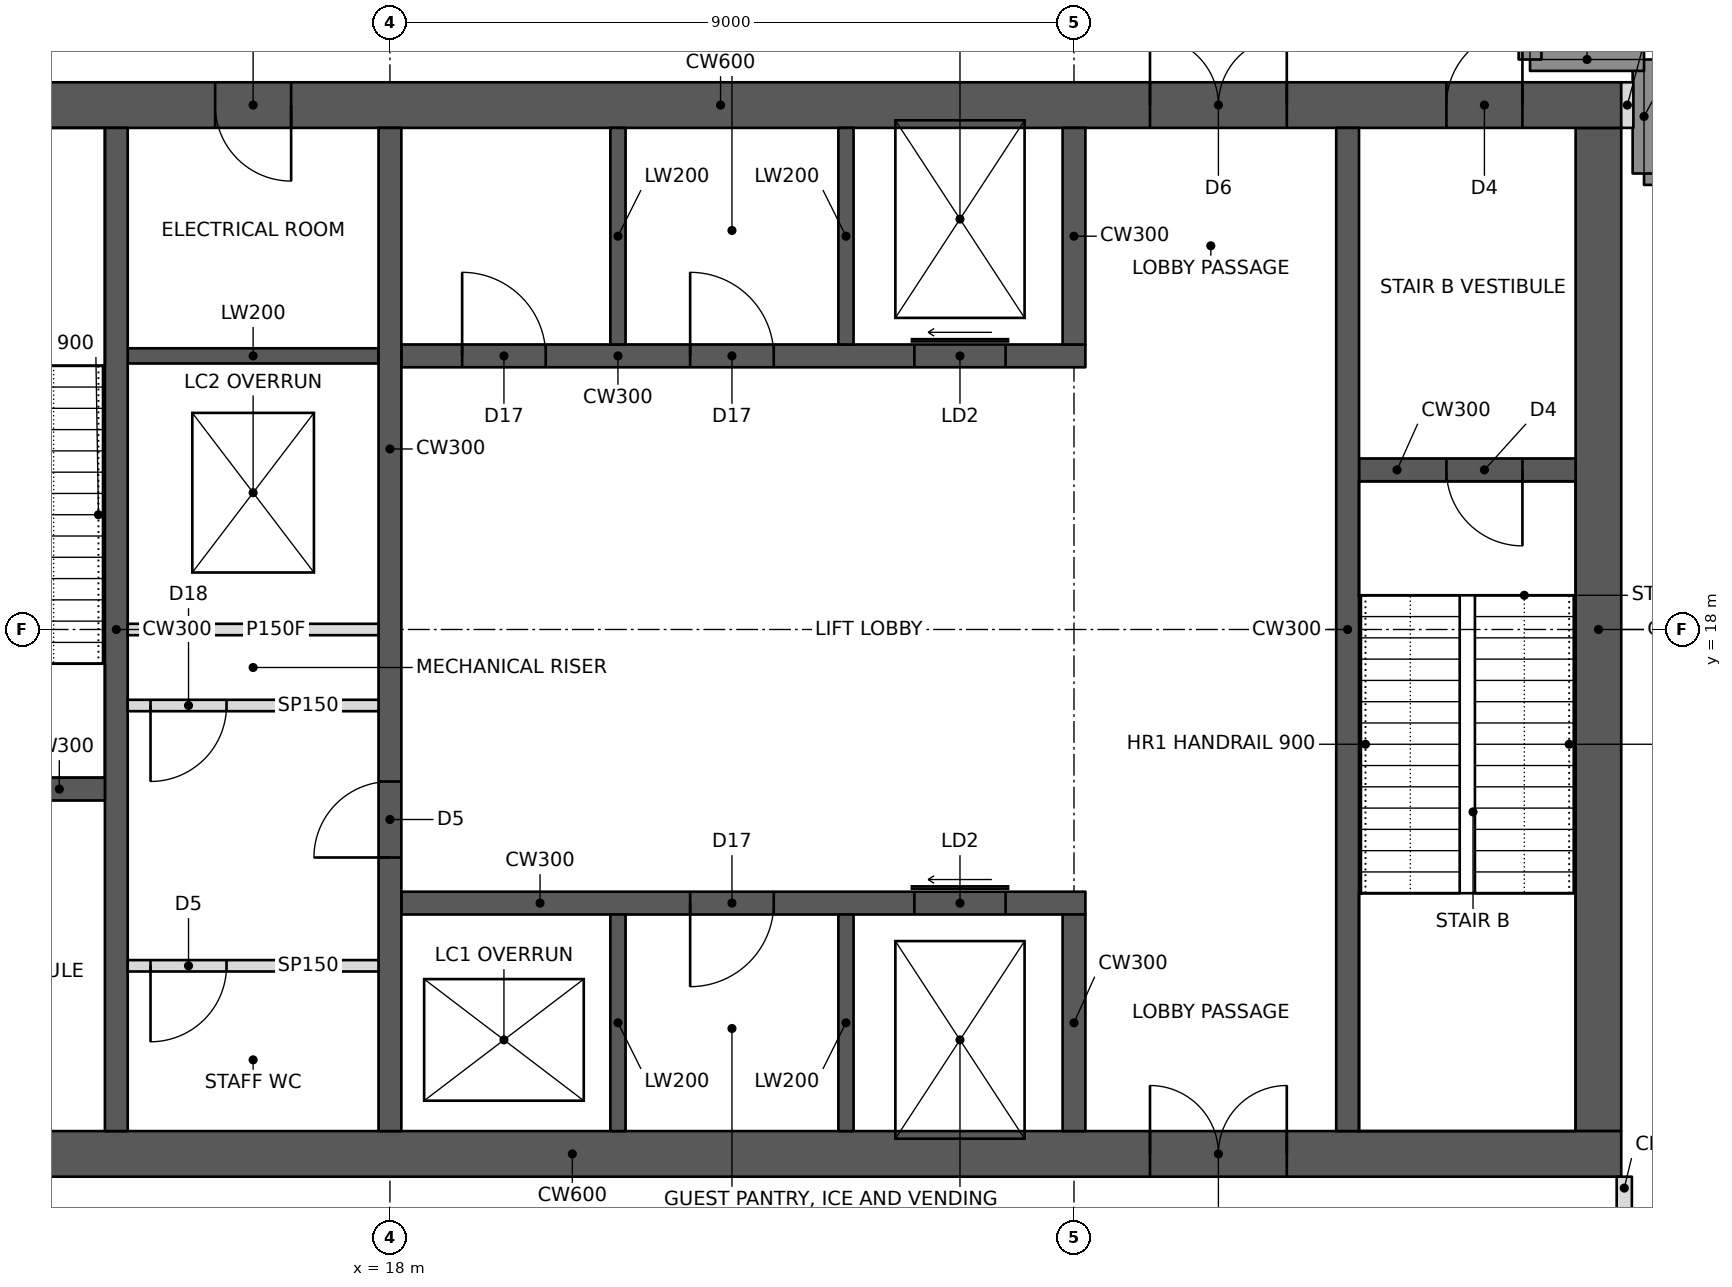
"""IFC4 building model, lengths in metres.
Left out: names, types, materials, properties, quantities, classifications, styles, units other than length and angle.
Written with IfcOpenShell. Run it as: python <this file> out.ifc"""

import sys

from ifc_helpers import new_model, si_unit, direction, frame, frame_2d, origin, place, context, subcontext, project, spatial, rectangle, extrude, element, fill, save


model = new_model("IFC4")
c1 = context("Model", 3, precision=1e-05, world=origin(), true_north=direction((0.0, 1.0)))
c2 = subcontext(c1, "Body", "Model", "MODEL_VIEW")
j1 = project(units=[si_unit("LENGTHUNIT", "METRE"), si_unit("PLANEANGLEUNIT", "RADIAN")], contexts=[c1])
p1 = place(None, origin())
s1 = spatial("IfcSite", under=j1, at=p1, CompositionType="ELEMENT")
p2 = place(p1, origin())
s2 = spatial("IfcBuilding", under=s1, at=p2, CompositionType="ELEMENT")
p3 = place(p2, frame((0.0, 0.0, 274.8)))
s3 = spatial("IfcBuildingStorey", under=s2, at=p3, CompositionType="ELEMENT", Elevation=274.8)
p4 = place(p3, frame((10.8, 11.1, 0.0), z_axis=(0.0, 0.0, 1.0), x_axis=(1.0, 0.0, 0.0)))
e1 = element("IfcWall", 1, at=p4, inside=s3, PredefinedType="SHEAR", context=c2, shape_type="SweptSolid", body=[
    extrude(rectangle(XDim=23.4, YDim=0.6, at=frame_2d((11.7, 0.0))), origin(), (0.0, 0.0, 1.0), 4.7),
])
p5 = place(p4, frame((1.0, 0.0, 0.0)))
e2 = element("IfcOpeningElement", 2, at=p5, cuts=e1, PredefinedType="OPENING", context=c2, shape_type="SweptSolid", body=[
    extrude(rectangle(XDim=1.0, YDim=2.1, at=frame_2d((0.5, 1.05))), frame((0.0, 0.31, 0.0), z_axis=(0.0, -1.0, 0.0), x_axis=(1.0, 0.0, 0.0)), (0.0, 0.0, 1.0), 0.62),
])
p6 = place(p4, frame((17.2, 0.0, 0.0)))
e3 = element("IfcOpeningElement", 3, at=p6, cuts=e1, PredefinedType="OPENING", context=c2, shape_type="SweptSolid", body=[
    extrude(rectangle(XDim=1.8, YDim=2.1, at=frame_2d((0.9, 1.05))), frame((0.0, 0.31, 0.0), z_axis=(0.0, -1.0, 0.0), x_axis=(1.0, 0.0, 0.0)), (0.0, 0.0, 1.0), 0.62),
])
p7 = place(p3, frame((10.8, 24.9, 0.0), z_axis=(0.0, 0.0, 1.0), x_axis=(1.0, 0.0, 0.0)))
e4 = element("IfcWall", 4, at=p7, inside=s3, PredefinedType="SHEAR", context=c2, shape_type="SweptSolid", body=[
    extrude(rectangle(XDim=23.4, YDim=0.6, at=frame_2d((11.7, 0.0))), origin(), (0.0, 0.0, 1.0), 4.7),
])
p8 = place(p7, frame((17.2, 0.0, 0.0)))
e5 = element("IfcOpeningElement", 5, at=p8, cuts=e4, PredefinedType="OPENING", context=c2, shape_type="SweptSolid", body=[
    extrude(rectangle(XDim=1.8, YDim=2.1, at=frame_2d((0.9, 1.05))), frame((0.0, 0.31, 0.0), z_axis=(0.0, -1.0, 0.0), x_axis=(1.0, 0.0, 0.0)), (0.0, 0.0, 1.0), 0.62),
])
p9 = place(p7, frame((21.1, 0.0, 0.0)))
e6 = element("IfcOpeningElement", 6, at=p9, cuts=e4, PredefinedType="OPENING", context=c2, shape_type="SweptSolid", body=[
    extrude(rectangle(XDim=1.0, YDim=2.1, at=frame_2d((0.5, 1.05))), frame((0.0, 0.31, 0.0), z_axis=(0.0, -1.0, 0.0), x_axis=(1.0, 0.0, 0.0)), (0.0, 0.0, 1.0), 0.62),
])
p10 = place(p7, frame((4.9, 0.0, 0.0)))
e7 = element("IfcOpeningElement", 7, at=p10, cuts=e4, PredefinedType="OPENING", context=c2, shape_type="SweptSolid", body=[
    extrude(rectangle(XDim=1.0, YDim=2.1, at=frame_2d((0.5, 1.05))), frame((0.0, 0.31, 0.0), z_axis=(0.0, -1.0, 0.0), x_axis=(1.0, 0.0, 0.0)), (0.0, 0.0, 1.0), 0.62),
])
p11 = place(p3, frame((33.9, 11.4, 0.0), z_axis=(0.0, 0.0, 1.0), x_axis=(0.0, 1.0, 0.0)))
e8 = element("IfcWall", 8, at=p11, inside=s3, PredefinedType="SHEAR", context=c2, shape_type="SweptSolid", body=[
    extrude(rectangle(XDim=13.2, YDim=0.6, at=frame_2d((6.6, 0.0))), origin(), (0.0, 0.0, 1.0), 4.7),
])
p12 = place(p3, frame((14.4, 11.4, 0.0), z_axis=(0.0, 0.0, 1.0), x_axis=(0.0, 1.0, 0.0)))
e9 = element("IfcWall", 9, at=p12, inside=s3, PredefinedType="SHEAR", context=c2, shape_type="SweptSolid", body=[
    extrude(rectangle(XDim=13.2, YDim=0.3, at=frame_2d((6.6, 0.0))), origin(), (0.0, 0.0, 1.0), 4.7),
])
p13 = place(p3, frame((11.4, 15.9, 0.0), z_axis=(0.0, 0.0, 1.0), x_axis=(1.0, 0.0, 0.0)))
e10 = element("IfcWall", 10, at=p13, inside=s3, PredefinedType="SHEAR", context=c2, shape_type="SweptSolid", body=[
    extrude(rectangle(XDim=2.85, YDim=0.3, at=frame_2d((1.425, 0.0))), origin(), (0.0, 0.0, 1.0), 4.7),
])
p14 = place(p13, frame((0.5, 0.0, 0.0)))
e11 = element("IfcOpeningElement", 11, at=p14, cuts=e10, PredefinedType="OPENING", context=c2, shape_type="SweptSolid", body=[
    extrude(rectangle(XDim=1.0, YDim=2.1, at=frame_2d((0.5, 1.05))), frame((0.0, 0.16, 0.0), z_axis=(0.0, -1.0, 0.0), x_axis=(1.0, 0.0, 0.0)), (0.0, 0.0, 1.0), 0.32),
])
p15 = place(p3, frame((18.0, 11.4, 0.0), z_axis=(0.0, 0.0, 1.0), x_axis=(0.0, 1.0, 0.0)))
e12 = element("IfcWall", 12, at=p15, inside=s3, PredefinedType="SHEAR", context=c2, shape_type="SweptSolid", body=[
    extrude(rectangle(XDim=13.2, YDim=0.3, at=frame_2d((6.6, 0.0))), origin(), (0.0, 0.0, 1.0), 4.7),
])
p16 = place(p15, frame((3.6, 0.0, 0.0)))
e13 = element("IfcOpeningElement", 13, at=p16, cuts=e12, PredefinedType="OPENING", context=c2, shape_type="SweptSolid", body=[
    extrude(rectangle(XDim=1.0, YDim=2.1, at=frame_2d((0.5, 1.05))), frame((0.0, 0.16, 0.0), z_axis=(0.0, -1.0, 0.0), x_axis=(1.0, 0.0, 0.0)), (0.0, 0.0, 1.0), 0.32),
])
p17 = place(p3, frame((14.55, 18.0, 0.0), z_axis=(0.0, 0.0, 1.0), x_axis=(1.0, 0.0, 0.0)))
e14 = element("IfcWall", 14, at=p17, inside=s3, PredefinedType="PARTITIONING", context=c2, shape_type="SweptSolid", body=[
    extrude(rectangle(XDim=3.3, YDim=0.15, at=frame_2d((1.65, 0.0))), origin(), (0.0, 0.0, 1.0), 4.7),
])
p18 = place(p3, frame((18.15, 14.4, 0.0), z_axis=(0.0, 0.0, 1.0), x_axis=(1.0, 0.0, 0.0)))
e15 = element("IfcWall", 15, at=p18, inside=s3, PredefinedType="SHEAR", context=c2, shape_type="SweptSolid", body=[
    extrude(rectangle(XDim=9.0, YDim=0.3, at=frame_2d((4.5, 0.0))), origin(), (0.0, 0.0, 1.0), 4.7),
])
p19 = place(p18, frame((6.75, 0.0, 0.0)))
e16 = element("IfcOpeningElement", 16, at=p19, cuts=e15, PredefinedType="OPENING", context=c2, shape_type="SweptSolid", body=[
    extrude(rectangle(XDim=1.2, YDim=2.1, at=frame_2d((0.6, 1.05))), frame((0.0, 0.16, 0.0), z_axis=(0.0, -1.0, 0.0), x_axis=(1.0, 0.0, 0.0)), (0.0, 0.0, 1.0), 0.32),
])
p20 = place(p18, frame((3.8, 0.0, 0.0)))
e17 = element("IfcOpeningElement", 17, at=p20, cuts=e15, PredefinedType="OPENING", context=c2, shape_type="SweptSolid", body=[
    extrude(rectangle(XDim=1.1, YDim=2.1, at=frame_2d((0.55, 1.05))), frame((0.0, 0.16, 0.0), z_axis=(0.0, -1.0, 0.0), x_axis=(1.0, 0.0, 0.0)), (0.0, 0.0, 1.0), 0.32),
])
p21 = place(p3, frame((27.0, 11.4, 0.0), z_axis=(0.0, 0.0, 1.0), x_axis=(0.0, 1.0, 0.0)))
e18 = element("IfcWall", 18, at=p21, inside=s3, PredefinedType="SHEAR", context=c2, shape_type="SweptSolid", body=[
    extrude(rectangle(XDim=2.85, YDim=0.3, at=frame_2d((1.425, 0.0))), origin(), (0.0, 0.0, 1.0), 4.7),
])
for number, where, z_axis, x_axis in (
    (19, (21.0, 11.4, 0.0), (0.0, 0.0, 1.0), (0.0, 1.0, 0.0)),
    (20, (24.0, 11.4, 0.0), (0.0, 0.0, 1.0), (0.0, 1.0, 0.0)),
):
    element("IfcWall", number, at=place(p3, frame(where, z_axis=z_axis, x_axis=x_axis)), inside=s3, PredefinedType="SHEAR", context=c2, shape_type="SweptSolid", body=[
        extrude(rectangle(XDim=2.85, YDim=0.2, at=frame_2d((1.425, 0.0))), origin(), (0.0, 0.0, 1.0), 4.7),
    ])
p22 = place(p3, frame((18.15, 21.6, 0.0), z_axis=(0.0, 0.0, 1.0), x_axis=(1.0, 0.0, 0.0)))
e21 = element("IfcWall", 21, at=p22, inside=s3, PredefinedType="SHEAR", context=c2, shape_type="SweptSolid", body=[
    extrude(rectangle(XDim=9.0, YDim=0.3, at=frame_2d((4.5, 0.0))), origin(), (0.0, 0.0, 1.0), 4.7),
])
p23 = place(p22, frame((6.75, 0.0, 0.0)))
e22 = element("IfcOpeningElement", 22, at=p23, cuts=e21, PredefinedType="OPENING", context=c2, shape_type="SweptSolid", body=[
    extrude(rectangle(XDim=1.2, YDim=2.1, at=frame_2d((0.6, 1.05))), frame((0.0, 0.16, 0.0), z_axis=(0.0, -1.0, 0.0), x_axis=(1.0, 0.0, 0.0)), (0.0, 0.0, 1.0), 0.32),
])
p24 = place(p22, frame((0.8, 0.0, 0.0)))
e23 = element("IfcOpeningElement", 23, at=p24, cuts=e21, PredefinedType="OPENING", context=c2, shape_type="SweptSolid", body=[
    extrude(rectangle(XDim=1.1, YDim=2.1, at=frame_2d((0.55, 1.05))), frame((0.0, 0.16, 0.0), z_axis=(0.0, -1.0, 0.0), x_axis=(1.0, 0.0, 0.0)), (0.0, 0.0, 1.0), 0.32),
])
p25 = place(p22, frame((3.8, 0.0, 0.0)))
e24 = element("IfcOpeningElement", 24, at=p25, cuts=e21, PredefinedType="OPENING", context=c2, shape_type="SweptSolid", body=[
    extrude(rectangle(XDim=1.1, YDim=2.1, at=frame_2d((0.55, 1.05))), frame((0.0, 0.16, 0.0), z_axis=(0.0, -1.0, 0.0), x_axis=(1.0, 0.0, 0.0)), (0.0, 0.0, 1.0), 0.32),
])
p26 = place(p3, frame((27.0, 21.75, 0.0), z_axis=(0.0, 0.0, 1.0), x_axis=(0.0, 1.0, 0.0)))
e25 = element("IfcWall", 25, at=p26, inside=s3, PredefinedType="SHEAR", context=c2, shape_type="SweptSolid", body=[
    extrude(rectangle(XDim=2.85, YDim=0.3, at=frame_2d((1.425, 0.0))), origin(), (0.0, 0.0, 1.0), 4.7),
])
for number, where, z_axis, x_axis in (
    (26, (21.0, 21.75, 0.0), (0.0, 0.0, 1.0), (0.0, 1.0, 0.0)),
    (27, (24.0, 21.75, 0.0), (0.0, 0.0, 1.0), (0.0, 1.0, 0.0)),
):
    element("IfcWall", number, at=place(p3, frame(where, z_axis=z_axis, x_axis=x_axis)), inside=s3, PredefinedType="SHEAR", context=c2, shape_type="SweptSolid", body=[
        extrude(rectangle(XDim=2.85, YDim=0.2, at=frame_2d((1.425, 0.0))), origin(), (0.0, 0.0, 1.0), 4.7),
    ])
p27 = place(p3, frame((30.6, 11.4, 0.0), z_axis=(0.0, 0.0, 1.0), x_axis=(0.0, 1.0, 0.0)))
e28 = element("IfcWall", 28, at=p27, inside=s3, PredefinedType="SHEAR", context=c2, shape_type="SweptSolid", body=[
    extrude(rectangle(XDim=13.2, YDim=0.3, at=frame_2d((6.6, 0.0))), origin(), (0.0, 0.0, 1.0), 4.7),
])
p28 = place(p3, frame((30.75, 20.1, 0.0), z_axis=(0.0, 0.0, 1.0), x_axis=(1.0, 0.0, 0.0)))
e29 = element("IfcWall", 29, at=p28, inside=s3, PredefinedType="SHEAR", context=c2, shape_type="SweptSolid", body=[
    extrude(rectangle(XDim=2.85, YDim=0.3, at=frame_2d((1.425, 0.0))), origin(), (0.0, 0.0, 1.0), 4.7),
])
p29 = place(p28, frame((1.15, 0.0, 0.0)))
e30 = element("IfcOpeningElement", 30, at=p29, cuts=e29, PredefinedType="OPENING", context=c2, shape_type="SweptSolid", body=[
    extrude(rectangle(XDim=1.0, YDim=2.1, at=frame_2d((0.5, 1.05))), frame((0.0, 0.16, 0.0), z_axis=(0.0, -1.0, 0.0), x_axis=(1.0, 0.0, 0.0)), (0.0, 0.0, 1.0), 0.32),
])
p30 = place(p3, frame((14.55, 21.6, 0.0), z_axis=(0.0, 0.0, 1.0), x_axis=(1.0, 0.0, 0.0)))
e31 = element("IfcWall", 31, at=p30, inside=s3, PredefinedType="SHEAR", context=c2, shape_type="SweptSolid", body=[
    extrude(rectangle(XDim=3.3, YDim=0.2, at=frame_2d((1.65, 0.0))), origin(), (0.0, 0.0, 1.0), 4.7),
])
p31 = place(p3, frame((36.0, 24.0, 0.0), z_axis=(0.0, 0.0, 1.0), x_axis=(-1.0, 0.0, 0.0)))
e32 = element("IfcWall", 32, at=p31, inside=s3, PredefinedType="SOLIDWALL", context=c2, shape_type="SweptSolid", body=[
    extrude(rectangle(XDim=1.5, YDim=0.3, at=frame_2d((0.75, 0.0))), origin(), (0.0, 0.0, 1.0), 3.92),
])
for number, where, z_axis, x_axis in (
    (33, (34.5, 24.0, 0.0), (0.0, 0.0, 1.0), (0.0, 1.0, 0.0)),
    (34, (34.5, 25.5, 0.0), (0.0, 0.0, 1.0), (-1.0, 0.0, 0.0)),
):
    element("IfcWall", number, at=place(p3, frame(where, z_axis=z_axis, x_axis=x_axis)), inside=s3, PredefinedType="SOLIDWALL", context=c2, shape_type="SweptSolid", body=[
        extrude(rectangle(XDim=1.5, YDim=0.3, at=frame_2d((0.75, 0.0))), origin(), (0.0, 0.0, 1.0), 4.7),
    ])
p32 = place(p3, frame((33.0, 25.5, 0.0), z_axis=(0.0, 0.0, 1.0), x_axis=(0.0, 1.0, 0.0)))
e35 = element("IfcWall", 35, at=p32, inside=s3, PredefinedType="SOLIDWALL", context=c2, shape_type="SweptSolid", body=[
    extrude(rectangle(XDim=1.5, YDim=0.3, at=frame_2d((0.75, 0.0))), origin(), (0.0, 0.0, 1.0), 3.92),
])
p33 = place(p3, frame((34.24, 9.1, 0.0), z_axis=(0.0, 0.0, 1.0), x_axis=(0.0, 1.0, 0.0)))
e36 = element("IfcWall", 36, at=p33, inside=s3, PredefinedType="PARTITIONING", context=c2, shape_type="SweptSolid", body=[
    extrude(rectangle(XDim=1.7, YDim=0.2, at=frame_2d((0.85, 0.0))), origin(), (0.0, 0.0, 1.0), 3.938),
])
p34 = place(p33, frame((0.25, 0.0, 0.0)))
e37 = element("IfcOpeningElement", 37, at=p34, cuts=e36, PredefinedType="OPENING", context=c2, shape_type="SweptSolid", body=[
    extrude(rectangle(XDim=1.0, YDim=2.1, at=frame_2d((0.5, 1.05))), frame((0.0, 0.11, 0.0), z_axis=(0.0, -1.0, 0.0), x_axis=(1.0, 0.0, 0.0)), (0.0, 0.0, 1.0), 0.22),
])
p35 = place(p3, frame((34.2, 24.9, 0.0), z_axis=(0.0, 0.0, 1.0), x_axis=(1.0, 0.0, 0.0)))
e38 = element("IfcWall", 38, at=p35, inside=s3, PredefinedType="PARTITIONING", context=c2, shape_type="SweptSolid", body=[
    extrude(rectangle(XDim=0.16, YDim=0.6, at=frame_2d((0.08, 0.0))), origin(), (0.0, 0.0, 1.0), 4.7),
])
p36 = place(p3, frame((14.55, 17.0, 0.0), z_axis=(0.0, 0.0, 1.0), x_axis=(1.0, 0.0, 0.0)))
e39 = element("IfcWall", 39, at=p36, inside=s3, PredefinedType="PARTITIONING", context=c2, shape_type="SweptSolid", body=[
    extrude(rectangle(XDim=3.3, YDim=0.15, at=frame_2d((1.65, 0.0))), origin(), (0.0, 0.0, 1.0), 4.7),
])
p37 = place(p36, frame((0.3, 0.0, 0.0)))
e40 = element("IfcOpeningElement", 40, at=p37, cuts=e39, PredefinedType="OPENING", context=c2, shape_type="SweptSolid", body=[
    extrude(rectangle(XDim=1.0, YDim=2.1, at=frame_2d((0.5, 1.05))), frame((0.0, 0.085, 0.0), z_axis=(0.0, -1.0, 0.0), x_axis=(1.0, 0.0, 0.0)), (0.0, 0.0, 1.0), 0.17),
])
p38 = place(p3, frame((14.55, 13.575, 0.0), z_axis=(0.0, 0.0, 1.0), x_axis=(1.0, 0.0, 0.0)))
e41 = element("IfcWall", 41, at=p38, inside=s3, PredefinedType="PARTITIONING", context=c2, shape_type="SweptSolid", body=[
    extrude(rectangle(XDim=3.3, YDim=0.15, at=frame_2d((1.65, 0.0))), origin(), (0.0, 0.0, 1.0), 4.7),
])
p39 = place(p38, frame((0.3, 0.0, 0.0)))
e42 = element("IfcOpeningElement", 42, at=p39, cuts=e41, PredefinedType="OPENING", context=c2, shape_type="SweptSolid", body=[
    extrude(rectangle(XDim=1.0, YDim=2.1, at=frame_2d((0.5, 1.05))), frame((0.0, 0.085, 0.0), z_axis=(0.0, -1.0, 0.0), x_axis=(1.0, 0.0, 0.0)), (0.0, 0.0, 1.0), 0.17),
])
p40 = place(p37, frame((1.0, 0.0, 0.0), z_axis=(0.0, 0.0, 1.0), x_axis=(-1.0, 0.0, 0.0)))
e43 = element("IfcDoor", 43, at=p40, inside=s3, OperationType="SINGLE_SWING_RIGHT", PredefinedType="DOOR", context=c2, shape_type="SweptSolid", body=[
    extrude(rectangle(XDim=1.0, YDim=2.1, at=frame_2d((0.5, 1.05))), frame((0.0, 0.025, 0.0), z_axis=(0.0, -1.0, 0.0), x_axis=(1.0, 0.0, 0.0)), (0.0, 0.0, 1.0), 0.05),
])
fill(e40, e43)
p41 = place(p39, frame((1.0, 0.0, 0.0), z_axis=(0.0, 0.0, 1.0), x_axis=(-1.0, 0.0, 0.0)))
e44 = element("IfcDoor", 44, at=p41, inside=s3, OperationType="SINGLE_SWING_RIGHT", PredefinedType="DOOR", context=c2, shape_type="SweptSolid", body=[
    extrude(rectangle(XDim=1.0, YDim=2.1, at=frame_2d((0.5, 1.05))), frame((0.0, 0.025, 0.0), z_axis=(0.0, -1.0, 0.0), x_axis=(1.0, 0.0, 0.0)), (0.0, 0.0, 1.0), 0.05),
])
fill(e42, e44)
p42 = place(p6, origin())
e45 = element("IfcDoor", 45, at=p42, inside=s3, OperationType="DOUBLE_DOOR_SINGLE_SWING", PredefinedType="DOOR", context=c2, shape_type="SweptSolid", body=[
    extrude(rectangle(XDim=1.8, YDim=2.1, at=frame_2d((0.9, 1.05))), frame((0.0, 0.025, 0.0), z_axis=(0.0, -1.0, 0.0), x_axis=(1.0, 0.0, 0.0)), (0.0, 0.0, 1.0), 0.05),
])
fill(e3, e45)
p43 = place(p8, origin())
e46 = element("IfcDoor", 46, at=p43, inside=s3, OperationType="DOUBLE_DOOR_SINGLE_SWING", PredefinedType="DOOR", context=c2, shape_type="SweptSolid", body=[
    extrude(rectangle(XDim=1.8, YDim=2.1, at=frame_2d((0.9, 1.05))), frame((0.0, 0.025, 0.0), z_axis=(0.0, -1.0, 0.0), x_axis=(1.0, 0.0, 0.0)), (0.0, 0.0, 1.0), 0.05),
])
fill(e5, e46)
p44 = place(p9, origin())
e47 = element("IfcDoor", 47, at=p44, inside=s3, OperationType="SINGLE_SWING_RIGHT", PredefinedType="DOOR", context=c2, shape_type="SweptSolid", body=[
    extrude(rectangle(XDim=1.0, YDim=2.1, at=frame_2d((0.5, 1.05))), frame((0.0, 0.025, 0.0), z_axis=(0.0, -1.0, 0.0), x_axis=(1.0, 0.0, 0.0)), (0.0, 0.0, 1.0), 0.05),
])
fill(e6, e47)
p45 = place(p29, frame((1.0, 0.0, 0.0), z_axis=(0.0, 0.0, 1.0), x_axis=(-1.0, 0.0, 0.0)))
e48 = element("IfcDoor", 48, at=p45, inside=s3, OperationType="SINGLE_SWING_LEFT", PredefinedType="DOOR", context=c2, shape_type="SweptSolid", body=[
    extrude(rectangle(XDim=1.0, YDim=2.1, at=frame_2d((0.5, 1.05))), frame((0.0, 0.025, 0.0), z_axis=(0.0, -1.0, 0.0), x_axis=(1.0, 0.0, 0.0)), (0.0, 0.0, 1.0), 0.05),
])
fill(e30, e48)
p46 = place(p16, origin())
e49 = element("IfcDoor", 49, at=p46, inside=s3, OperationType="SINGLE_SWING_LEFT", PredefinedType="DOOR", context=c2, shape_type="SweptSolid", body=[
    extrude(rectangle(XDim=1.0, YDim=2.1, at=frame_2d((0.5, 1.05))), frame((0.0, 0.025, 0.0), z_axis=(0.0, -1.0, 0.0), x_axis=(1.0, 0.0, 0.0)), (0.0, 0.0, 1.0), 0.05),
])
fill(e13, e49)
p47 = place(p10, frame((1.0, 0.0, 0.0), z_axis=(0.0, 0.0, 1.0), x_axis=(-1.0, 0.0, 0.0)))
e50 = element("IfcDoor", 50, at=p47, inside=s3, OperationType="SINGLE_SWING_LEFT", PredefinedType="DOOR", context=c2, shape_type="SweptSolid", body=[
    extrude(rectangle(XDim=1.0, YDim=2.1, at=frame_2d((0.5, 1.05))), frame((0.0, 0.025, 0.0), z_axis=(0.0, -1.0, 0.0), x_axis=(1.0, 0.0, 0.0)), (0.0, 0.0, 1.0), 0.05),
])
fill(e7, e50)
p48 = place(p19, origin())
e51 = element("IfcDoor", 51, at=p48, inside=s3, OperationType="SLIDING_TO_LEFT", PredefinedType="DOOR", context=c2, shape_type="SweptSolid", body=[
    extrude(rectangle(XDim=1.2, YDim=2.1, at=frame_2d((0.6, 1.05))), frame((0.0, 0.025, 0.0), z_axis=(0.0, -1.0, 0.0), x_axis=(1.0, 0.0, 0.0)), (0.0, 0.0, 1.0), 0.05),
])
fill(e16, e51)
p49 = place(p23, origin())
e52 = element("IfcDoor", 52, at=p49, inside=s3, OperationType="SLIDING_TO_LEFT", PredefinedType="DOOR", context=c2, shape_type="SweptSolid", body=[
    extrude(rectangle(XDim=1.2, YDim=2.1, at=frame_2d((0.6, 1.05))), frame((0.0, 0.025, 0.0), z_axis=(0.0, -1.0, 0.0), x_axis=(1.0, 0.0, 0.0)), (0.0, 0.0, 1.0), 0.05),
])
fill(e22, e52)
p50 = place(p24, origin())
e53 = element("IfcDoor", 53, at=p50, inside=s3, OperationType="SINGLE_SWING_LEFT", PredefinedType="DOOR", context=c2, shape_type="SweptSolid", body=[
    extrude(rectangle(XDim=1.1, YDim=2.1, at=frame_2d((0.55, 1.05))), frame((0.0, 0.025, 0.0), z_axis=(0.0, -1.0, 0.0), x_axis=(1.0, 0.0, 0.0)), (0.0, 0.0, 1.0), 0.05),
])
fill(e23, e53)
p51 = place(p25, origin())
e54 = element("IfcDoor", 54, at=p51, inside=s3, OperationType="SINGLE_SWING_LEFT", PredefinedType="DOOR", context=c2, shape_type="SweptSolid", body=[
    extrude(rectangle(XDim=1.1, YDim=2.1, at=frame_2d((0.55, 1.05))), frame((0.0, 0.025, 0.0), z_axis=(0.0, -1.0, 0.0), x_axis=(1.0, 0.0, 0.0)), (0.0, 0.0, 1.0), 0.05),
])
fill(e24, e54)
p52 = place(p20, frame((1.1, 0.0, 0.0), z_axis=(0.0, 0.0, 1.0), x_axis=(-1.0, 0.0, 0.0)))
e55 = element("IfcDoor", 55, at=p52, inside=s3, OperationType="SINGLE_SWING_RIGHT", PredefinedType="DOOR", context=c2, shape_type="SweptSolid", body=[
    extrude(rectangle(XDim=1.1, YDim=2.1, at=frame_2d((0.55, 1.05))), frame((0.0, 0.025, 0.0), z_axis=(0.0, -1.0, 0.0), x_axis=(1.0, 0.0, 0.0)), (0.0, 0.0, 1.0), 0.05),
])
fill(e17, e55)
save(model, sys.argv[1])
